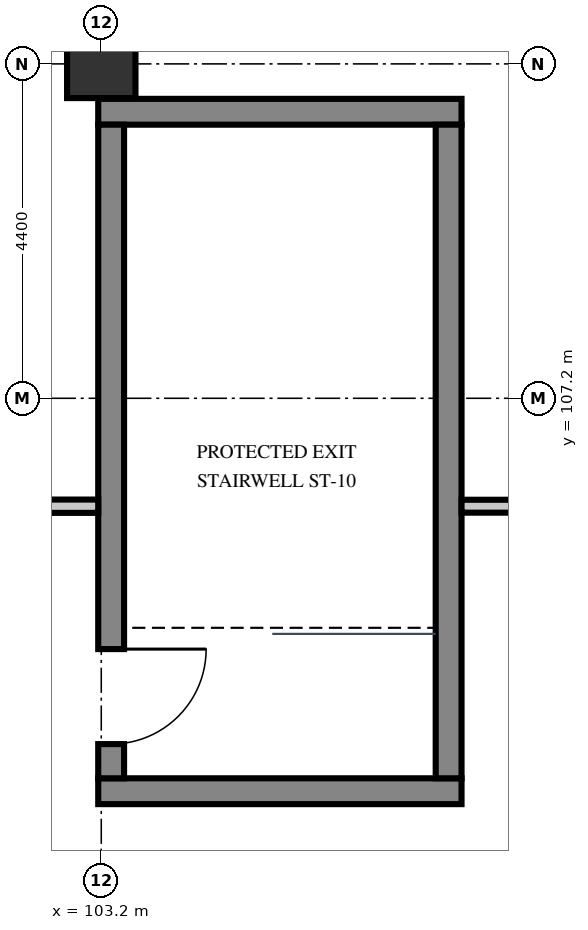
"""IFC4 building model, lengths in metres.
Left out: names, types, materials, properties, quantities, classifications, styles, units other than length and angle.
Written with IfcOpenShell. Run it as: python <this file> out.ifc"""

import sys

from ifc_helpers import new_model, si_unit, direction, frame, frame_2d, origin, origin_2d, place, context, subcontext, project, spatial, rectangle, extrude, element, fill, save


model = new_model("IFC4")
c1 = context("Model", 3, precision=1e-05, world=origin(), true_north=direction((0.0, 1.0)))
c2 = subcontext(c1, "Body", "Model", "MODEL_VIEW")
j1 = project(units=[si_unit("LENGTHUNIT", "METRE"), si_unit("PLANEANGLEUNIT", "RADIAN")], contexts=[c1])
p1 = place(None, origin())
s1 = spatial("IfcSite", under=j1, at=p1, CompositionType="ELEMENT")
p2 = place(p1, origin())
s2 = spatial("IfcBuilding", under=s1, at=p2, CompositionType="ELEMENT")
p3 = place(p2, frame((0.0, 0.0, 10.2)))
s3 = spatial("IfcBuildingStorey", under=s2, at=p3, CompositionType="ELEMENT", Elevation=10.2)
p4 = place(p3, frame((103.2, 111.6, 0.0), z_axis=(0.0, 0.0, 1.0), x_axis=(1.0, 0.0, 0.0)))
e1 = element("IfcColumn", 1, at=p4, inside=s3, PredefinedType="COLUMN", context=c2, shape_type="SweptSolid", body=[
    extrude(rectangle(XDim=0.9, YDim=0.9, at=origin_2d()), origin(), (0.0, 0.0, 1.0), 4.8),
])
for number, where, z_axis, x_axis in (
    (2, (103.16, 102.03, 0.0), (0.0, 0.0, 1.0), (1.0, 0.0, 0.0)),
    (3, (103.16, 110.97, 0.0), (0.0, 0.0, 1.0), (1.0, 0.0, 0.0)),
):
    element("IfcWall", number, at=place(p3, frame(where, z_axis=z_axis, x_axis=x_axis)), inside=s3, PredefinedType="SHEAR", context=c2, shape_type="SweptSolid", body=[
        extrude(rectangle(XDim=4.78, YDim=0.34, at=frame_2d((2.39, 0.0))), origin(), (0.0, 0.0, 1.0), 4.515),
    ])
p5 = place(p3, frame((107.77, 102.2, 0.0), z_axis=(0.0, 0.0, 1.0), x_axis=(0.0, 1.0, 0.0)))
e4 = element("IfcWall", 4, at=p5, inside=s3, PredefinedType="SHEAR", context=c2, shape_type="SweptSolid", body=[
    extrude(rectangle(XDim=8.6, YDim=0.34, at=frame_2d((4.3, 0.0))), origin(), (0.0, 0.0, 1.0), 4.515),
])
p6 = place(p3, frame((103.33, 102.2, 0.0), z_axis=(0.0, 0.0, 1.0), x_axis=(0.0, 1.0, 0.0)))
e5 = element("IfcWall", 5, at=p6, inside=s3, PredefinedType="SHEAR", context=c2, shape_type="SweptSolid", body=[
    extrude(rectangle(XDim=8.6, YDim=0.34, at=frame_2d((4.3, 0.0))), origin(), (0.0, 0.0, 1.0), 4.515),
])
p7 = place(p6, frame((0.45, 0.0, 0.0)))
e6 = element("IfcOpeningElement", 6, at=p7, cuts=e5, PredefinedType="OPENING", context=c2, shape_type="SweptSolid", body=[
    extrude(rectangle(XDim=1.25, YDim=2.2, at=frame_2d((0.625, 1.1))), frame((0.0, 0.182, 0.0), z_axis=(0.0, -1.0, 0.0), x_axis=(1.0, 0.0, 0.0)), (0.0, 0.0, 1.0), 0.364),
])
p8 = place(p3, frame((103.16, 105.78, 0.0), z_axis=(0.0, 0.0, 1.0), x_axis=(-1.0, 0.0, 0.0)))
e7 = element("IfcWall", 7, at=p8, inside=s3, PredefinedType="PARTITIONING", context=c2, shape_type="SweptSolid", body=[
    extrude(rectangle(XDim=50.053, YDim=0.175, at=frame_2d((25.027, 0.0))), origin(), (0.0, 0.0, 1.0), 4.515),
])
p9 = place(p8, frame((24.877, 0.0, 0.0)))
e8 = element("IfcOpeningElement", 8, at=p9, cuts=e7, PredefinedType="OPENING", context=c2, shape_type="SweptSolid", body=[
    extrude(rectangle(XDim=1.0, YDim=2.2, at=frame_2d((0.5, 1.1))), frame((0.0, 0.1, 0.0), z_axis=(0.0, -1.0, 0.0), x_axis=(1.0, 0.0, 0.0)), (0.0, 0.0, 1.0), 0.199),
])
p10 = place(p3, frame((125.88, 105.78, 0.0), z_axis=(0.0, 0.0, 1.0), x_axis=(-1.0, 0.0, 0.0)))
e9 = element("IfcWall", 9, at=p10, inside=s3, PredefinedType="PARTITIONING", context=c2, shape_type="SweptSolid", body=[
    extrude(rectangle(XDim=17.94, YDim=0.17, at=frame_2d((8.97, 0.0))), origin(), (0.0, 0.0, 1.0), 4.515),
])
p11 = place(p7, frame((1.25, 0.0, 0.0), z_axis=(0.0, 0.0, 1.0), x_axis=(-1.0, 0.0, 0.0)))
e10 = element("IfcDoor", 10, at=p11, inside=s3, OperationType="SINGLE_SWING_LEFT", PredefinedType="DOOR", context=c2, shape_type="SweptSolid", body=[
    extrude(rectangle(XDim=1.25, YDim=2.2, at=frame_2d((0.625, 1.1))), frame((0.0, 0.025, 0.0), z_axis=(0.0, -1.0, 0.0), x_axis=(1.0, 0.0, 0.0)), (0.0, 0.0, 1.0), 0.05),
])
fill(e6, e10)
save(model, sys.argv[1])
